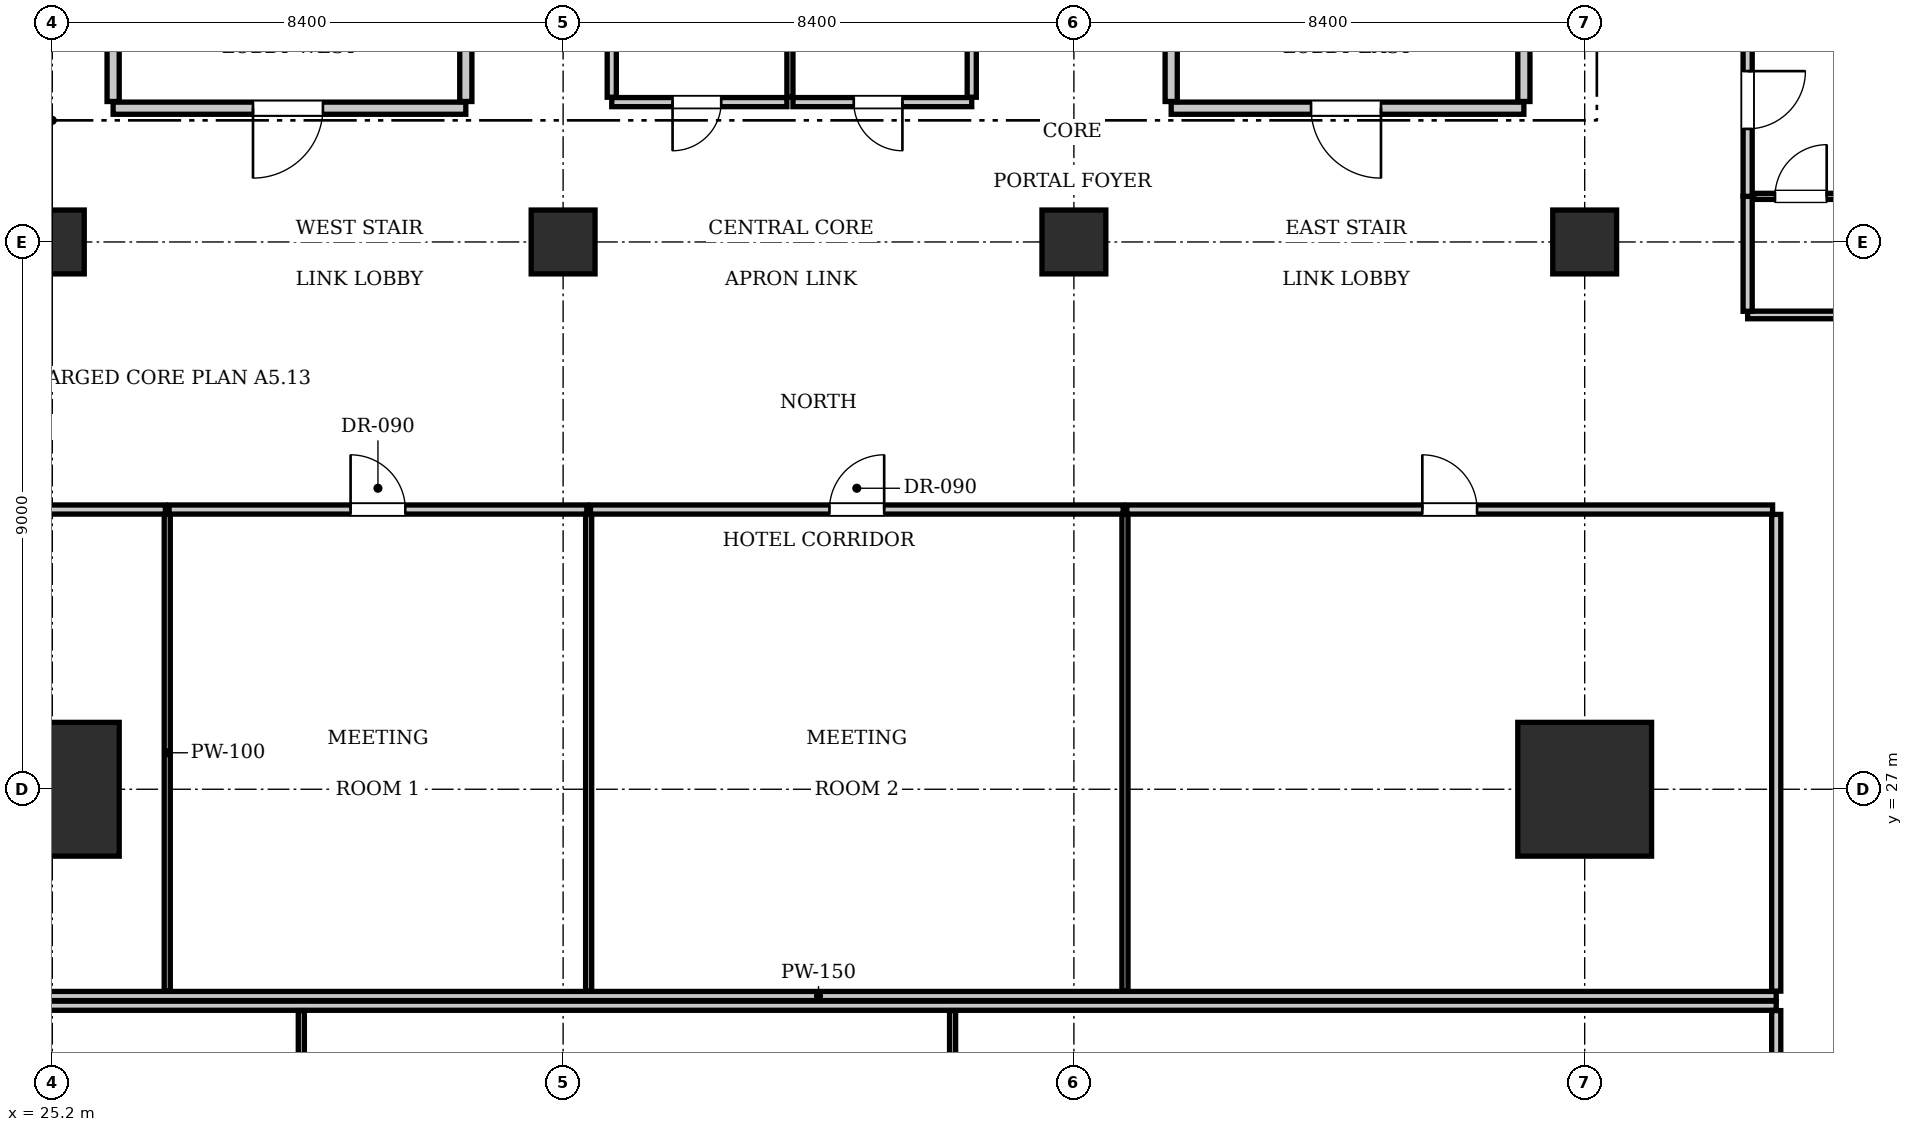
"""IFC4 building model, lengths in metres.
Left out: names, types, materials, properties, quantities, classifications, styles, units other than length and angle.
Written with IfcOpenShell. Run it as: python <this file> out.ifc"""

import sys

from ifc_helpers import new_model, si_unit, direction, frame, frame_2d, origin, origin_2d, place, context, subcontext, project, spatial, rectangle, extrude, element, fill, save


model = new_model("IFC4")
c1 = context("Model", 3, precision=1e-05, world=origin(), true_north=direction((0.0, 1.0)))
c2 = subcontext(c1, "Body", "Model", "MODEL_VIEW")
j1 = project(units=[si_unit("LENGTHUNIT", "METRE"), si_unit("PLANEANGLEUNIT", "RADIAN")], contexts=[c1])
p1 = place(None, origin())
s1 = spatial("IfcSite", under=j1, at=p1, CompositionType="ELEMENT")
p2 = place(p1, origin())
s2 = spatial("IfcBuilding", under=s1, at=p2, CompositionType="ELEMENT")
p3 = place(p2, frame((0.0, 0.0, 84.7)))
s3 = spatial("IfcBuildingStorey", under=s2, at=p3, CompositionType="ELEMENT", Elevation=84.7)
for number, where, z_axis, x_axis in (
    (1, (25.2, 27.0, 0.0), (0.0, 0.0, 1.0), (1.0, 0.0, 0.0)),
    (2, (50.4, 27.0, 0.0), (0.0, 0.0, 1.0), (1.0, 0.0, 0.0)),
):
    element("IfcColumn", number, at=place(p3, frame(where, z_axis=z_axis, x_axis=x_axis)), inside=s3, PredefinedType="COLUMN", context=c2, shape_type="SweptSolid", body=[
        extrude(rectangle(XDim=2.2, YDim=2.2, at=origin_2d()), origin(), (0.0, 0.0, 1.0), 3.85),
    ])
for number, where, z_axis, x_axis in (
    (3, (25.2, 36.0, 0.0), (0.0, 0.0, 1.0), (1.0, 0.0, 0.0)),
    (4, (33.6, 36.0, 0.0), (0.0, 0.0, 1.0), (1.0, 0.0, 0.0)),
    (5, (42.0, 36.0, 0.0), (0.0, 0.0, 1.0), (1.0, 0.0, 0.0)),
    (6, (50.4, 36.0, 0.0), (0.0, 0.0, 1.0), (1.0, 0.0, 0.0)),
):
    element("IfcColumn", number, at=place(p3, frame(where, z_axis=z_axis, x_axis=x_axis)), inside=s3, PredefinedType="COLUMN", context=c2, shape_type="SweptSolid", body=[
        extrude(rectangle(XDim=1.05, YDim=1.05, at=origin_2d()), origin(), (0.0, 0.0, 1.0), 3.85),
    ])
p4 = place(p3, frame((26.2, 38.2, 0.0), z_axis=(0.0, 0.0, 1.0), x_axis=(1.0, 0.0, 0.0)))
e7 = element("IfcWall", 7, at=p4, inside=s3, PredefinedType="PARTITIONING", context=c2, shape_type="SweptSolid", body=[
    extrude(rectangle(XDim=5.8, YDim=0.2, at=frame_2d((2.9, 0.0))), origin(), (0.0, 0.0, 1.0), 3.61),
])
p5 = place(p4, frame((2.3, 0.0, 0.0)))
e8 = element("IfcOpeningElement", 8, at=p5, cuts=e7, PredefinedType="OPENING", context=c2, shape_type="SweptSolid", body=[
    extrude(rectangle(XDim=1.15, YDim=2.15, at=frame_2d((0.575, 1.075))), frame((0.0, 0.11, 0.0), z_axis=(0.0, -1.0, 0.0), x_axis=(1.0, 0.0, 0.0)), (0.0, 0.0, 1.0), 0.22),
])
for number, where, z_axis, x_axis in (
    (9, (26.2, 38.31, 0.0), (0.0, 0.0, 1.0), (0.0, 1.0, 0.0)),
    (10, (32.0, 38.31, 0.0), (0.0, 0.0, 1.0), (0.0, 1.0, 0.0)),
):
    element("IfcWall", number, at=place(p3, frame(where, z_axis=z_axis, x_axis=x_axis)), inside=s3, PredefinedType="PARTITIONING", context=c2, shape_type="SweptSolid", body=[
        extrude(rectangle(XDim=3.07, YDim=0.2, at=frame_2d((1.535, 0.0))), origin(), (0.0, 0.0, 1.0), 3.61),
    ])
p6 = place(p3, frame((43.6, 38.2, 0.0), z_axis=(0.0, 0.0, 1.0), x_axis=(1.0, 0.0, 0.0)))
e11 = element("IfcWall", 11, at=p6, inside=s3, PredefinedType="PARTITIONING", context=c2, shape_type="SweptSolid", body=[
    extrude(rectangle(XDim=5.8, YDim=0.2, at=frame_2d((2.9, 0.0))), origin(), (0.0, 0.0, 1.0), 3.61),
])
p7 = place(p6, frame((2.3, 0.0, 0.0)))
e12 = element("IfcOpeningElement", 12, at=p7, cuts=e11, PredefinedType="OPENING", context=c2, shape_type="SweptSolid", body=[
    extrude(rectangle(XDim=1.15, YDim=2.15, at=frame_2d((0.575, 1.075))), frame((0.0, 0.11, 0.0), z_axis=(0.0, -1.0, 0.0), x_axis=(1.0, 0.0, 0.0)), (0.0, 0.0, 1.0), 0.22),
])
for number, where, z_axis, x_axis in (
    (13, (43.6, 38.31, 0.0), (0.0, 0.0, 1.0), (0.0, 1.0, 0.0)),
    (14, (49.4, 38.31, 0.0), (0.0, 0.0, 1.0), (0.0, 1.0, 0.0)),
):
    element("IfcWall", number, at=place(p3, frame(where, z_axis=z_axis, x_axis=x_axis)), inside=s3, PredefinedType="PARTITIONING", context=c2, shape_type="SweptSolid", body=[
        extrude(rectangle(XDim=3.07, YDim=0.2, at=frame_2d((1.535, 0.0))), origin(), (0.0, 0.0, 1.0), 3.61),
    ])
p8 = place(p3, frame((34.4, 38.3, 0.0), z_axis=(0.0, 0.0, 1.0), x_axis=(1.0, 0.0, 0.0)))
e15 = element("IfcWall", 15, at=p8, inside=s3, PredefinedType="PARTITIONING", context=c2, shape_type="SweptSolid", body=[
    extrude(rectangle(XDim=2.88, YDim=0.15, at=frame_2d((1.44, 0.0))), origin(), (0.0, 0.0, 1.0), 3.61),
])
p9 = place(p8, frame((1.0, 0.0, 0.0)))
e16 = element("IfcOpeningElement", 16, at=p9, cuts=e15, PredefinedType="OPENING", context=c2, shape_type="SweptSolid", body=[
    extrude(rectangle(XDim=0.8, YDim=2.05, at=frame_2d((0.4, 1.025))), frame((0.0, 0.085, 0.0), z_axis=(0.0, -1.0, 0.0), x_axis=(1.0, 0.0, 0.0)), (0.0, 0.0, 1.0), 0.17),
])
p10 = place(p3, frame((37.38, 38.3, 0.0), z_axis=(0.0, 0.0, 1.0), x_axis=(1.0, 0.0, 0.0)))
e17 = element("IfcWall", 17, at=p10, inside=s3, PredefinedType="PARTITIONING", context=c2, shape_type="SweptSolid", body=[
    extrude(rectangle(XDim=2.94, YDim=0.15, at=frame_2d((1.47, 0.0))), origin(), (0.0, 0.0, 1.0), 3.61),
])
p11 = place(p10, frame((1.0, 0.0, 0.0)))
e18 = element("IfcOpeningElement", 18, at=p11, cuts=e17, PredefinedType="OPENING", context=c2, shape_type="SweptSolid", body=[
    extrude(rectangle(XDim=0.8, YDim=2.05, at=frame_2d((0.4, 1.025))), frame((0.0, 0.085, 0.0), z_axis=(0.0, -1.0, 0.0), x_axis=(1.0, 0.0, 0.0)), (0.0, 0.0, 1.0), 0.17),
])
p12 = place(p3, frame((34.4, 38.38, 0.0), z_axis=(0.0, 0.0, 1.0), x_axis=(0.0, 1.0, 0.0)))
e19 = element("IfcWall", 19, at=p12, inside=s3, PredefinedType="PARTITIONING", context=c2, shape_type="SweptSolid", body=[
    extrude(rectangle(XDim=2.84, YDim=0.15, at=frame_2d((1.42, 0.0))), origin(), (0.0, 0.0, 1.0), 3.61),
])
p13 = place(p3, frame((37.33, 38.38, 0.0), z_axis=(0.0, 0.0, 1.0), x_axis=(0.0, 1.0, 0.0)))
e20 = element("IfcWall", 20, at=p13, inside=s3, PredefinedType="PARTITIONING", context=c2, shape_type="SweptSolid", body=[
    extrude(rectangle(XDim=2.84, YDim=0.1, at=frame_2d((1.42, 0.0))), origin(), (0.0, 0.0, 1.0), 3.61),
])
p14 = place(p3, frame((40.32, 38.38, 0.0), z_axis=(0.0, 0.0, 1.0), x_axis=(0.0, 1.0, 0.0)))
e21 = element("IfcWall", 21, at=p14, inside=s3, PredefinedType="PARTITIONING", context=c2, shape_type="SweptSolid", body=[
    extrude(rectangle(XDim=2.84, YDim=0.15, at=frame_2d((1.42, 0.0))), origin(), (0.0, 0.0, 1.0), 3.61),
])
p15 = place(p3, frame((22.05, 23.6, 0.0), z_axis=(0.0, 0.0, 1.0), x_axis=(1.0, 0.0, 0.0)))
e22 = element("IfcWall", 22, at=p15, inside=s3, PredefinedType="PARTITIONING", context=c2, shape_type="SweptSolid", body=[
    extrude(rectangle(XDim=31.5, YDim=0.15, at=frame_2d((15.75, 0.0))), origin(), (0.0, 0.0, 1.0), 3.61),
])
p16 = place(p3, frame((53.55, 23.68, 0.0), z_axis=(0.0, 0.0, 1.0), x_axis=(0.0, 1.0, 0.0)))
e23 = element("IfcWall", 23, at=p16, inside=s3, PredefinedType="PARTITIONING", context=c2, shape_type="SweptSolid", body=[
    extrude(rectangle(XDim=7.84, YDim=0.15, at=frame_2d((3.92, 0.0))), origin(), (0.0, 0.0, 1.0), 3.61),
])
p17 = place(p3, frame((22.11, 31.6, 0.0), z_axis=(0.0, 0.0, 1.0), x_axis=(1.0, 0.0, 0.0)))
e24 = element("IfcWall", 24, at=p17, inside=s3, PredefinedType="PARTITIONING", context=c2, shape_type="SweptSolid", body=[
    extrude(rectangle(XDim=4.95, YDim=0.15, at=frame_2d((2.475, 0.0))), origin(), (0.0, 0.0, 1.0), 3.61),
])
p18 = place(p17, frame((2.025, 0.0, 0.0)))
e25 = element("IfcOpeningElement", 25, at=p18, cuts=e24, PredefinedType="OPENING", context=c2, shape_type="SweptSolid", body=[
    extrude(rectangle(XDim=0.9, YDim=2.1, at=frame_2d((0.45, 1.05))), frame((0.0, 0.085, 0.0), z_axis=(0.0, -1.0, 0.0), x_axis=(1.0, 0.0, 0.0)), (0.0, 0.0, 1.0), 0.17),
])
p19 = place(p3, frame((27.09, 23.68, 0.0), z_axis=(0.0, 0.0, 1.0), x_axis=(0.0, 1.0, 0.0)))
e26 = element("IfcWall", 26, at=p19, inside=s3, PredefinedType="PARTITIONING", context=c2, shape_type="SweptSolid", body=[
    extrude(rectangle(XDim=7.84, YDim=0.1, at=frame_2d((3.92, 0.0))), origin(), (0.0, 0.0, 1.0), 3.61),
])
p20 = place(p3, frame((27.12, 31.6, 0.0), z_axis=(0.0, 0.0, 1.0), x_axis=(1.0, 0.0, 0.0)))
e27 = element("IfcWall", 27, at=p20, inside=s3, PredefinedType="PARTITIONING", context=c2, shape_type="SweptSolid", body=[
    extrude(rectangle(XDim=6.87, YDim=0.15, at=frame_2d((3.435, 0.0))), origin(), (0.0, 0.0, 1.0), 3.61),
])
p21 = place(p20, frame((2.985, 0.0, 0.0)))
e28 = element("IfcOpeningElement", 28, at=p21, cuts=e27, PredefinedType="OPENING", context=c2, shape_type="SweptSolid", body=[
    extrude(rectangle(XDim=0.9, YDim=2.1, at=frame_2d((0.45, 1.05))), frame((0.0, 0.085, 0.0), z_axis=(0.0, -1.0, 0.0), x_axis=(1.0, 0.0, 0.0)), (0.0, 0.0, 1.0), 0.17),
])
p22 = place(p3, frame((34.02, 23.68, 0.0), z_axis=(0.0, 0.0, 1.0), x_axis=(0.0, 1.0, 0.0)))
e29 = element("IfcWall", 29, at=p22, inside=s3, PredefinedType="PARTITIONING", context=c2, shape_type="SweptSolid", body=[
    extrude(rectangle(XDim=7.84, YDim=0.1, at=frame_2d((3.92, 0.0))), origin(), (0.0, 0.0, 1.0), 3.61),
])
p23 = place(p3, frame((34.05, 31.6, 0.0), z_axis=(0.0, 0.0, 1.0), x_axis=(1.0, 0.0, 0.0)))
e30 = element("IfcWall", 30, at=p23, inside=s3, PredefinedType="PARTITIONING", context=c2, shape_type="SweptSolid", body=[
    extrude(rectangle(XDim=8.76, YDim=0.15, at=frame_2d((4.38, 0.0))), origin(), (0.0, 0.0, 1.0), 3.61),
])
p24 = place(p23, frame((3.93, 0.0, 0.0)))
e31 = element("IfcOpeningElement", 31, at=p24, cuts=e30, PredefinedType="OPENING", context=c2, shape_type="SweptSolid", body=[
    extrude(rectangle(XDim=0.9, YDim=2.1, at=frame_2d((0.45, 1.05))), frame((0.0, 0.085, 0.0), z_axis=(0.0, -1.0, 0.0), x_axis=(1.0, 0.0, 0.0)), (0.0, 0.0, 1.0), 0.17),
])
p25 = place(p3, frame((42.84, 23.68, 0.0), z_axis=(0.0, 0.0, 1.0), x_axis=(0.0, 1.0, 0.0)))
e32 = element("IfcWall", 32, at=p25, inside=s3, PredefinedType="PARTITIONING", context=c2, shape_type="SweptSolid", body=[
    extrude(rectangle(XDim=7.84, YDim=0.1, at=frame_2d((3.92, 0.0))), origin(), (0.0, 0.0, 1.0), 3.61),
])
p26 = place(p3, frame((42.87, 31.6, 0.0), z_axis=(0.0, 0.0, 1.0), x_axis=(1.0, 0.0, 0.0)))
e33 = element("IfcWall", 33, at=p26, inside=s3, PredefinedType="PARTITIONING", context=c2, shape_type="SweptSolid", body=[
    extrude(rectangle(XDim=10.62, YDim=0.15, at=frame_2d((5.31, 0.0))), origin(), (0.0, 0.0, 1.0), 3.61),
])
p27 = place(p26, frame((4.86, 0.0, 0.0)))
e34 = element("IfcOpeningElement", 34, at=p27, cuts=e33, PredefinedType="OPENING", context=c2, shape_type="SweptSolid", body=[
    extrude(rectangle(XDim=0.9, YDim=2.1, at=frame_2d((0.45, 1.05))), frame((0.0, 0.085, 0.0), z_axis=(0.0, -1.0, 0.0), x_axis=(1.0, 0.0, 0.0)), (0.0, 0.0, 1.0), 0.17),
])
p28 = place(p3, frame((22.05, 23.44, 0.0), z_axis=(0.0, 0.0, 1.0), x_axis=(1.0, 0.0, 0.0)))
e35 = element("IfcWall", 35, at=p28, inside=s3, PredefinedType="PARTITIONING", context=c2, shape_type="SweptSolid", body=[
    extrude(rectangle(XDim=31.5, YDim=0.15, at=frame_2d((15.75, 0.0))), origin(), (0.0, 0.0, 1.0), 3.61),
])
p29 = place(p3, frame((53.55, 15.53, 0.0), z_axis=(0.0, 0.0, 1.0), x_axis=(0.0, 1.0, 0.0)))
e36 = element("IfcWall", 36, at=p29, inside=s3, PredefinedType="PARTITIONING", context=c2, shape_type="SweptSolid", body=[
    extrude(rectangle(XDim=7.83, YDim=0.15, at=frame_2d((3.915, 0.0))), origin(), (0.0, 0.0, 1.0), 3.61),
])
p30 = place(p3, frame((29.295, 15.53, 0.0), z_axis=(0.0, 0.0, 1.0), x_axis=(0.0, 1.0, 0.0)))
e37 = element("IfcWall", 37, at=p30, inside=s3, PredefinedType="PARTITIONING", context=c2, shape_type="SweptSolid", body=[
    extrude(rectangle(XDim=7.83, YDim=0.1, at=frame_2d((3.915, 0.0))), origin(), (0.0, 0.0, 1.0), 3.255),
])
p31 = place(p3, frame((40.005, 15.53, 0.0), z_axis=(0.0, 0.0, 1.0), x_axis=(0.0, 1.0, 0.0)))
e38 = element("IfcWall", 38, at=p31, inside=s3, PredefinedType="PARTITIONING", context=c2, shape_type="SweptSolid", body=[
    extrude(rectangle(XDim=7.83, YDim=0.1, at=frame_2d((3.915, 0.0))), origin(), (0.0, 0.0, 1.0), 3.61),
])
p32 = place(p3, frame((53.08, 34.8, 0.0), z_axis=(0.0, 0.0, 1.0), x_axis=(1.0, 0.0, 0.0)))
e39 = element("IfcWall", 39, at=p32, inside=s3, PredefinedType="PARTITIONING", context=c2, shape_type="SweptSolid", body=[
    extrude(rectangle(XDim=11.62, YDim=0.125, at=frame_2d((5.81, 0.0))), origin(), (0.0, 0.0, 1.0), 3.61),
])
p33 = place(p3, frame((53.08, 34.86, 0.0), z_axis=(0.0, 0.0, 1.0), x_axis=(0.0, 1.0, 0.0)))
e40 = element("IfcWall", 40, at=p33, inside=s3, PredefinedType="PARTITIONING", context=c2, shape_type="SweptSolid", body=[
    extrude(rectangle(XDim=1.89, YDim=0.15, at=frame_2d((0.945, 0.0))), origin(), (0.0, 0.0, 1.0), 3.61),
])
p34 = place(p3, frame((53.08, 36.75, 0.0), z_axis=(0.0, 0.0, 1.0), x_axis=(0.0, 1.0, 0.0)))
e41 = element("IfcWall", 41, at=p34, inside=s3, PredefinedType="PARTITIONING", context=c2, shape_type="SweptSolid", body=[
    extrude(rectangle(XDim=3.169, YDim=0.15, at=frame_2d((1.584, 0.0))), origin(), (0.0, 0.0, 1.0), 3.61),
])
p35 = place(p34, frame((1.11, 0.0, 0.0)))
e42 = element("IfcOpeningElement", 42, at=p35, cuts=e41, PredefinedType="OPENING", context=c2, shape_type="SweptSolid", body=[
    extrude(rectangle(XDim=0.95, YDim=2.15, at=frame_2d((0.475, 1.075))), frame((0.0, 0.085, 0.0), z_axis=(0.0, -1.0, 0.0), x_axis=(1.0, 0.0, 0.0)), (0.0, 0.0, 1.0), 0.17),
])
p36 = place(p3, frame((53.18, 36.75, 0.0), z_axis=(0.0, 0.0, 1.0), x_axis=(1.0, 0.0, 0.0)))
e43 = element("IfcWall", 43, at=p36, inside=s3, PredefinedType="PARTITIONING", context=c2, shape_type="SweptSolid", body=[
    extrude(rectangle(XDim=2.3, YDim=0.1, at=frame_2d((1.15, 0.0))), origin(), (0.0, 0.0, 1.0), 3.61),
])
p37 = place(p36, frame((0.35, 0.0, 0.0)))
e44 = element("IfcOpeningElement", 44, at=p37, cuts=e43, PredefinedType="OPENING", context=c2, shape_type="SweptSolid", body=[
    extrude(rectangle(XDim=0.85, YDim=2.1, at=frame_2d((0.425, 1.05))), frame((0.0, 0.06, 0.0), z_axis=(0.0, -1.0, 0.0), x_axis=(1.0, 0.0, 0.0)), (0.0, 0.0, 1.0), 0.12),
])
p38 = place(p5, frame((1.15, 0.0, 0.0), z_axis=(0.0, 0.0, 1.0), x_axis=(-1.0, 0.0, 0.0)))
e45 = element("IfcDoor", 45, at=p38, inside=s3, OperationType="SINGLE_SWING_RIGHT", PredefinedType="DOOR", context=c2, shape_type="SweptSolid", body=[
    extrude(rectangle(XDim=1.15, YDim=2.15, at=frame_2d((0.575, 1.075))), frame((0.0, 0.025, 0.0), z_axis=(0.0, -1.0, 0.0), x_axis=(1.0, 0.0, 0.0)), (0.0, 0.0, 1.0), 0.05),
])
fill(e8, e45)
p39 = place(p7, frame((1.15, 0.0, 0.0), z_axis=(0.0, 0.0, 1.0), x_axis=(-1.0, 0.0, 0.0)))
e46 = element("IfcDoor", 46, at=p39, inside=s3, OperationType="SINGLE_SWING_LEFT", PredefinedType="DOOR", context=c2, shape_type="SweptSolid", body=[
    extrude(rectangle(XDim=1.15, YDim=2.15, at=frame_2d((0.575, 1.075))), frame((0.0, 0.025, 0.0), z_axis=(0.0, -1.0, 0.0), x_axis=(1.0, 0.0, 0.0)), (0.0, 0.0, 1.0), 0.05),
])
fill(e12, e46)
p40 = place(p9, frame((0.8, 0.0, 0.0), z_axis=(0.0, 0.0, 1.0), x_axis=(-1.0, 0.0, 0.0)))
e47 = element("IfcDoor", 47, at=p40, inside=s3, OperationType="SINGLE_SWING_RIGHT", PredefinedType="DOOR", context=c2, shape_type="SweptSolid", body=[
    extrude(rectangle(XDim=0.8, YDim=2.05, at=frame_2d((0.4, 1.025))), frame((0.0, 0.025, 0.0), z_axis=(0.0, -1.0, 0.0), x_axis=(1.0, 0.0, 0.0)), (0.0, 0.0, 1.0), 0.05),
])
fill(e16, e47)
p41 = place(p11, frame((0.8, 0.0, 0.0), z_axis=(0.0, 0.0, 1.0), x_axis=(-1.0, 0.0, 0.0)))
e48 = element("IfcDoor", 48, at=p41, inside=s3, OperationType="SINGLE_SWING_LEFT", PredefinedType="DOOR", context=c2, shape_type="SweptSolid", body=[
    extrude(rectangle(XDim=0.8, YDim=2.05, at=frame_2d((0.4, 1.025))), frame((0.0, 0.025, 0.0), z_axis=(0.0, -1.0, 0.0), x_axis=(1.0, 0.0, 0.0)), (0.0, 0.0, 1.0), 0.05),
])
fill(e18, e48)
p42 = place(p21, origin())
e49 = element("IfcDoor", 49, at=p42, inside=s3, OperationType="SINGLE_SWING_LEFT", PredefinedType="DOOR", context=c2, shape_type="SweptSolid", body=[
    extrude(rectangle(XDim=0.9, YDim=2.1, at=frame_2d((0.45, 1.05))), frame((0.0, 0.025, 0.0), z_axis=(0.0, -1.0, 0.0), x_axis=(1.0, 0.0, 0.0)), (0.0, 0.0, 1.0), 0.05),
])
fill(e28, e49)
p43 = place(p24, origin())
e50 = element("IfcDoor", 50, at=p43, inside=s3, OperationType="SINGLE_SWING_RIGHT", PredefinedType="DOOR", context=c2, shape_type="SweptSolid", body=[
    extrude(rectangle(XDim=0.9, YDim=2.1, at=frame_2d((0.45, 1.05))), frame((0.0, 0.025, 0.0), z_axis=(0.0, -1.0, 0.0), x_axis=(1.0, 0.0, 0.0)), (0.0, 0.0, 1.0), 0.05),
])
fill(e31, e50)
p44 = place(p27, origin())
e51 = element("IfcDoor", 51, at=p44, inside=s3, OperationType="SINGLE_SWING_LEFT", PredefinedType="DOOR", context=c2, shape_type="SweptSolid", body=[
    extrude(rectangle(XDim=0.9, YDim=2.1, at=frame_2d((0.45, 1.05))), frame((0.0, 0.025, 0.0), z_axis=(0.0, -1.0, 0.0), x_axis=(1.0, 0.0, 0.0)), (0.0, 0.0, 1.0), 0.05),
])
fill(e34, e51)
p45 = place(p37, origin())
e52 = element("IfcDoor", 52, at=p45, inside=s3, OperationType="SINGLE_SWING_RIGHT", PredefinedType="DOOR", context=c2, shape_type="SweptSolid", body=[
    extrude(rectangle(XDim=0.85, YDim=2.1, at=frame_2d((0.425, 1.05))), frame((0.0, 0.025, 0.0), z_axis=(0.0, -1.0, 0.0), x_axis=(1.0, 0.0, 0.0)), (0.0, 0.0, 1.0), 0.05),
])
fill(e44, e52)
p46 = place(p35, frame((0.95, 0.0, 0.0), z_axis=(0.0, 0.0, 1.0), x_axis=(-1.0, 0.0, 0.0)))
e53 = element("IfcDoor", 53, at=p46, inside=s3, OperationType="SINGLE_SWING_LEFT", PredefinedType="DOOR", context=c2, shape_type="SweptSolid", body=[
    extrude(rectangle(XDim=0.95, YDim=2.15, at=frame_2d((0.475, 1.075))), frame((0.0, 0.025, 0.0), z_axis=(0.0, -1.0, 0.0), x_axis=(1.0, 0.0, 0.0)), (0.0, 0.0, 1.0), 0.05),
])
fill(e42, e53)
save(model, sys.argv[1])
